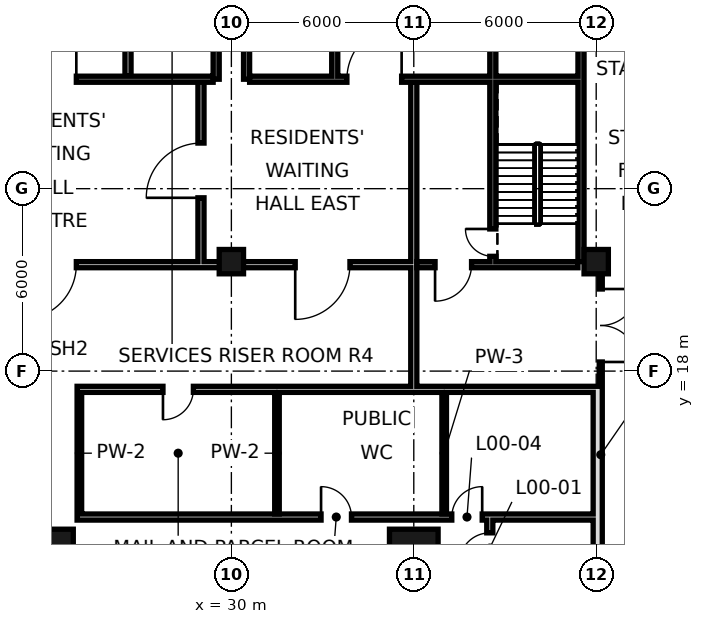
"""IFC4 building model, lengths in metres.
Left out: names, types, materials, properties, quantities, classifications, styles, units other than length and angle.
Written with IfcOpenShell. Run it as: python <this file> out.ifc"""

import sys

from ifc_helpers import new_model, si_unit, direction, frame, frame_2d, origin, origin_2d, place, context, subcontext, project, spatial, rectangle, hollow_rectangle, extrude, element, fill, save


model = new_model("IFC4")
c1 = context("Model", 3, precision=1e-05, world=origin(), true_north=direction((0.0, 1.0)))
c2 = subcontext(c1, "Body", "Model", "MODEL_VIEW")
j1 = project(units=[si_unit("LENGTHUNIT", "METRE"), si_unit("PLANEANGLEUNIT", "RADIAN")], contexts=[c1])
p1 = place(None, origin())
s1 = spatial("IfcSite", under=j1, at=p1, CompositionType="ELEMENT")
p2 = place(p1, origin())
s2 = spatial("IfcBuilding", under=s1, at=p2, CompositionType="ELEMENT")
p3 = place(p2, origin())
s3 = spatial("IfcBuildingStorey", under=s2, at=p3, CompositionType="ELEMENT", Elevation=0.0)
p4 = place(p3, frame((24.0, 12.0, 0.0), z_axis=(0.0, 0.0, 1.0), x_axis=(1.0, 0.0, 0.0)))
e1 = element("IfcColumn", 1, at=p4, inside=s3, PredefinedType="COLUMN", context=c2, shape_type="SweptSolid", body=[
    extrude(hollow_rectangle(XDim=1.6, YDim=1.6, WallThickness=0.07, at=origin_2d()), origin(), (0.0, 0.0, 1.0), 15.0),
])
p5 = place(p3, frame((30.0, 21.6, 0.0), z_axis=(0.0, 0.0, 1.0), x_axis=(1.0, 0.0, 0.0)))
e2 = element("IfcColumn", 2, at=p5, inside=s3, PredefinedType="COLUMN", context=c2, shape_type="SweptSolid", body=[
    extrude(hollow_rectangle(XDim=0.8, YDim=0.8, WallThickness=0.07, at=origin_2d()), origin(), (0.0, 0.0, 1.0), 15.0),
])
p6 = place(p3, frame((36.0, 12.0, 0.0), z_axis=(0.0, 0.0, 1.0), x_axis=(1.0, 0.0, 0.0)))
e3 = element("IfcColumn", 3, at=p6, inside=s3, PredefinedType="COLUMN", context=c2, shape_type="SweptSolid", body=[
    extrude(hollow_rectangle(XDim=1.6, YDim=1.6, WallThickness=0.07, at=origin_2d()), origin(), (0.0, 0.0, 1.0), 15.0),
])
p7 = place(p3, frame((42.0, 21.6, 0.0), z_axis=(0.0, 0.0, 1.0), x_axis=(1.0, 0.0, 0.0)))
e4 = element("IfcColumn", 4, at=p7, inside=s3, PredefinedType="COLUMN", context=c2, shape_type="SweptSolid", body=[
    extrude(hollow_rectangle(XDim=0.8, YDim=0.8, WallThickness=0.07, at=origin_2d()), origin(), (0.0, 0.0, 1.0), 15.0),
])
p8 = place(p3, frame((42.15, 8.9, 0.0), z_axis=(0.0, 0.0, 1.0), x_axis=(0.0, 1.0, 0.0)))
e5 = element("IfcWall", 5, at=p8, inside=s3, PredefinedType="SOLIDWALL", context=c2, shape_type="SweptSolid", body=[
    extrude(rectangle(XDim=12.7, YDim=0.1, at=frame_2d((6.35, 0.0))), origin(), (0.0, 0.0, 1.0), 13.83),
])
p9 = place(p8, frame((9.4, 0.0, 0.0)))
e6 = element("IfcOpeningElement", 6, at=p9, cuts=e5, PredefinedType="OPENING", context=c2, shape_type="SweptSolid", body=[
    extrude(rectangle(XDim=2.4, YDim=2.6, at=frame_2d((1.2, 1.3))), frame((0.0, 0.06, 0.0), z_axis=(0.0, -1.0, 0.0), x_axis=(1.0, 0.0, 0.0)), (0.0, 0.0, 1.0), 0.12),
])
p10 = place(p3, frame((25.0, 13.1, 0.0), z_axis=(0.0, 0.0, 1.0), x_axis=(0.0, 1.0, 0.0)))
e7 = element("IfcWall", 7, at=p10, inside=s3, PredefinedType="PARTITIONING", context=c2, shape_type="SweptSolid", body=[
    extrude(rectangle(XDim=4.4, YDim=0.15, at=frame_2d((2.2, 0.0))), origin(), (0.0, 0.0, 1.0), 14.55),
])
p11 = place(p3, frame((31.5, 13.3, 0.0), z_axis=(0.0, 0.0, 1.0), x_axis=(0.0, 1.0, 0.0)))
e8 = element("IfcWall", 8, at=p11, inside=s3, PredefinedType="PARTITIONING", context=c2, shape_type="SweptSolid", body=[
    extrude(rectangle(XDim=4.0, YDim=0.15, at=frame_2d((2.0, 0.0))), origin(), (0.0, 0.0, 1.0), 14.55),
])
p12 = place(p3, frame((36.0, 17.5, 0.0), z_axis=(0.0, 0.0, 1.0), x_axis=(0.0, 1.0, 0.0)))
e9 = element("IfcWall", 9, at=p12, inside=s3, PredefinedType="SOLIDWALL", context=c2, shape_type="SweptSolid", body=[
    extrude(rectangle(XDim=4.0, YDim=0.2, at=frame_2d((2.0, 0.0))), origin(), (0.0, 0.0, 1.0), 13.85),
])
p13 = place(p3, frame((37.0, 13.3, 0.0), z_axis=(0.0, 0.0, 1.0), x_axis=(0.0, 1.0, 0.0)))
e10 = element("IfcWall", 10, at=p13, inside=s3, PredefinedType="PARTITIONING", context=c2, shape_type="SweptSolid", body=[
    extrude(rectangle(XDim=4.0, YDim=0.15, at=frame_2d((2.0, 0.0))), origin(), (0.0, 0.0, 1.0), 14.55),
])
p14 = place(p3, frame((38.5, 8.9, 0.0), z_axis=(0.0, 0.0, 1.0), x_axis=(0.0, 1.0, 0.0)))
e11 = element("IfcWall", 11, at=p14, inside=s3, PredefinedType="SOLIDWALL", context=c2, shape_type="SweptSolid", body=[
    extrude(rectangle(XDim=4.2, YDim=0.2, at=frame_2d((2.1, 0.0))), origin(), (0.0, 0.0, 1.0), 13.85),
])
p15 = place(p14, frame((2.78, 0.0, 0.0)))
e12 = element("IfcOpeningElement", 12, at=p15, cuts=e11, PredefinedType="OPENING", context=c2, shape_type="SweptSolid", body=[
    extrude(rectangle(XDim=1.0, YDim=2.4, at=frame_2d((0.5, 1.2))), frame((0.0, 0.11, 0.0), z_axis=(0.0, -1.0, 0.0), x_axis=(1.0, 0.0, 0.0)), (0.0, 0.0, 1.0), 0.22),
])
p16 = place(p3, frame((42.0, 8.9, 0.0), z_axis=(0.0, 0.0, 1.0), x_axis=(0.0, 1.0, 0.0)))
e13 = element("IfcWall", 13, at=p16, inside=s3, PredefinedType="SOLIDWALL", context=c2, shape_type="SweptSolid", body=[
    extrude(rectangle(XDim=8.6, YDim=0.2, at=frame_2d((4.3, 0.0))), origin(), (0.0, 0.0, 1.0), 13.85),
])
p17 = place(p3, frame((25.075, 13.2, 0.0), z_axis=(0.0, 0.0, 1.0), x_axis=(1.0, 0.0, 0.0)))
e14 = element("IfcWall", 14, at=p17, inside=s3, PredefinedType="SOLIDWALL", context=c2, shape_type="SweptSolid", body=[
    extrude(rectangle(XDim=16.825, YDim=0.2, at=frame_2d((8.413, 0.0))), origin(), (0.0, 0.0, 1.0), 13.85),
])
p18 = place(p17, frame((12.175, 0.0, 0.0)))
e15 = element("IfcOpeningElement", 15, at=p18, cuts=e14, PredefinedType="OPENING", context=c2, shape_type="SweptSolid", body=[
    extrude(rectangle(XDim=1.0, YDim=2.4, at=frame_2d((0.5, 1.2))), frame((0.0, 0.11, 0.0), z_axis=(0.0, -1.0, 0.0), x_axis=(1.0, 0.0, 0.0)), (0.0, 0.0, 1.0), 0.22),
])
p19 = place(p17, frame((7.875, 0.0, 0.0)))
e16 = element("IfcOpeningElement", 16, at=p19, cuts=e14, PredefinedType="OPENING", context=c2, shape_type="SweptSolid", body=[
    extrude(rectangle(XDim=1.0, YDim=2.4, at=frame_2d((0.5, 1.2))), frame((0.0, 0.11, 0.0), z_axis=(0.0, -1.0, 0.0), x_axis=(1.0, 0.0, 0.0)), (0.0, 0.0, 1.0), 0.22),
])
p20 = place(p3, frame((25.075, 17.4, 0.0), z_axis=(0.0, 0.0, 1.0), x_axis=(1.0, 0.0, 0.0)))
e17 = element("IfcWall", 17, at=p20, inside=s3, PredefinedType="SOLIDWALL", context=c2, shape_type="SweptSolid", body=[
    extrude(rectangle(XDim=16.825, YDim=0.2, at=frame_2d((8.413, 0.0))), origin(), (0.0, 0.0, 1.0), 13.85),
])
p21 = place(p20, frame((2.675, 0.0, 0.0)))
e18 = element("IfcOpeningElement", 18, at=p21, cuts=e17, PredefinedType="OPENING", context=c2, shape_type="SweptSolid", body=[
    extrude(rectangle(XDim=1.0, YDim=2.1, at=frame_2d((0.5, 1.05))), frame((0.0, 0.11, 0.0), z_axis=(0.0, -1.0, 0.0), x_axis=(1.0, 0.0, 0.0)), (0.0, 0.0, 1.0), 0.22),
])
p22 = place(p3, frame((41.5, 21.6, 0.0), z_axis=(0.0, 0.0, 1.0), x_axis=(0.0, 1.0, 0.0)))
e19 = element("IfcWall", 19, at=p22, inside=s3, PredefinedType="SOLIDWALL", context=c2, shape_type="SweptSolid", body=[
    extrude(rectangle(XDim=23.5, YDim=0.2, at=frame_2d((11.75, 0.0))), origin(), (0.0, 0.0, 1.0), 14.55),
])
for number, where, z_axis, x_axis in (
    (20, (29.5, 27.6, 0.0), (0.0, 0.0, 1.0), (0.0, 1.0, 0.0)),
    (21, (30.5, 27.6, 0.0), (0.0, 0.0, 1.0), (0.0, 1.0, 0.0)),
):
    element("IfcWall", number, at=place(p3, frame(where, z_axis=z_axis, x_axis=x_axis)), inside=s3, PredefinedType="SOLIDWALL", context=c2, shape_type="SweptSolid", body=[
        extrude(rectangle(XDim=17.5, YDim=0.2, at=frame_2d((8.75, 0.0))), origin(), (0.0, 0.0, 1.0), 14.55),
    ])
p23 = place(p3, frame((12.1, 21.5, 0.0), z_axis=(0.0, 0.0, 1.0), x_axis=(1.0, 0.0, 0.0)))
e22 = element("IfcWall", 22, at=p23, inside=s3, PredefinedType="SOLIDWALL", context=c2, shape_type="SweptSolid", body=[
    extrude(rectangle(XDim=23.8, YDim=0.2, at=frame_2d((11.9, 0.0))), origin(), (0.0, 0.0, 1.0), 13.85),
])
p24 = place(p23, frame((2.0, 0.0, 0.0)))
e23 = element("IfcOpeningElement", 23, at=p24, cuts=e22, PredefinedType="OPENING", context=c2, shape_type="SweptSolid", body=[
    extrude(rectangle(XDim=1.8, YDim=2.1, at=frame_2d((0.9, 1.05))), frame((0.0, 0.11, 0.0), z_axis=(0.0, -1.0, 0.0), x_axis=(1.0, 0.0, 0.0)), (0.0, 0.0, 1.0), 0.22),
])
p25 = place(p23, frame((11.0, 0.0, 0.0)))
e24 = element("IfcOpeningElement", 24, at=p25, cuts=e22, PredefinedType="OPENING", context=c2, shape_type="SweptSolid", body=[
    extrude(rectangle(XDim=1.8, YDim=2.1, at=frame_2d((0.9, 1.05))), frame((0.0, 0.11, 0.0), z_axis=(0.0, -1.0, 0.0), x_axis=(1.0, 0.0, 0.0)), (0.0, 0.0, 1.0), 0.22),
])
p26 = place(p23, frame((20.0, 0.0, 0.0)))
e25 = element("IfcOpeningElement", 25, at=p26, cuts=e22, PredefinedType="OPENING", context=c2, shape_type="SweptSolid", body=[
    extrude(rectangle(XDim=1.8, YDim=2.1, at=frame_2d((0.9, 1.05))), frame((0.0, 0.11, 0.0), z_axis=(0.0, -1.0, 0.0), x_axis=(1.0, 0.0, 0.0)), (0.0, 0.0, 1.0), 0.22),
])
p27 = place(p3, frame((29.0, 21.6, 0.0), z_axis=(0.0, 0.0, 1.0), x_axis=(0.0, 1.0, 0.0)))
e26 = element("IfcWall", 26, at=p27, inside=s3, PredefinedType="PARTITIONING", context=c2, shape_type="SweptSolid", body=[
    extrude(rectangle(XDim=6.0, YDim=0.2, at=frame_2d((3.0, 0.0))), origin(), (0.0, 0.0, 1.0), 13.85),
])
p28 = place(p27, frame((2.1, 0.0, 0.0)))
e27 = element("IfcOpeningElement", 27, at=p28, cuts=e26, PredefinedType="OPENING", context=c2, shape_type="SweptSolid", body=[
    extrude(rectangle(XDim=1.8, YDim=2.1, at=frame_2d((0.9, 1.05))), frame((0.0, 0.11, 0.0), z_axis=(0.0, -1.0, 0.0), x_axis=(1.0, 0.0, 0.0)), (0.0, 0.0, 1.0), 0.22),
])
p29 = place(p3, frame((26.6, 27.7, 0.0), z_axis=(0.0, 0.0, 1.0), x_axis=(0.0, 1.0, 0.0)))
e28 = element("IfcWall", 28, at=p29, inside=s3, PredefinedType="SOLIDWALL", context=c2, shape_type="SweptSolid", body=[
    extrude(rectangle(XDim=17.3, YDim=0.2, at=frame_2d((8.65, 0.0))), origin(), (0.0, 0.0, 1.0), 14.55),
])
p30 = place(p29, frame((4.1, 0.0, 0.0)))
e29 = element("IfcOpeningElement", 29, at=p30, cuts=e28, PredefinedType="OPENING", context=c2, shape_type="SweptSolid", body=[
    extrude(rectangle(XDim=0.9, YDim=2.1, at=frame_2d((0.45, 1.05))), frame((0.0, 0.11, 0.0), z_axis=(0.0, -1.0, 0.0), x_axis=(1.0, 0.0, 0.0)), (0.0, 0.0, 1.0), 0.22),
])
p31 = place(p29, frame((10.15, 0.0, 0.0)))
e30 = element("IfcOpeningElement", 30, at=p31, cuts=e28, PredefinedType="OPENING", context=c2, shape_type="SweptSolid", body=[
    extrude(rectangle(XDim=1.0, YDim=2.1, at=frame_2d((0.5, 1.05))), frame((0.0, 0.11, 0.0), z_axis=(0.0, -1.0, 0.0), x_axis=(1.0, 0.0, 0.0)), (0.0, 0.0, 1.0), 0.22),
])
p32 = place(p29, frame((15.275, 0.0, 0.0)))
e31 = element("IfcOpeningElement", 31, at=p32, cuts=e28, PredefinedType="OPENING", context=c2, shape_type="SweptSolid", body=[
    extrude(rectangle(XDim=1.0, YDim=2.1, at=frame_2d((0.5, 1.05))), frame((0.0, 0.11, 0.0), z_axis=(0.0, -1.0, 0.0), x_axis=(1.0, 0.0, 0.0)), (0.0, 0.0, 1.0), 0.22),
])
p33 = place(p3, frame((33.4, 27.7, 0.0), z_axis=(0.0, 0.0, 1.0), x_axis=(0.0, 1.0, 0.0)))
e32 = element("IfcWall", 32, at=p33, inside=s3, PredefinedType="SOLIDWALL", context=c2, shape_type="SweptSolid", body=[
    extrude(rectangle(XDim=17.3, YDim=0.2, at=frame_2d((8.65, 0.0))), origin(), (0.0, 0.0, 1.0), 13.85),
])
p34 = place(p33, frame((15.2, 0.0, 0.0)))
e33 = element("IfcOpeningElement", 33, at=p34, cuts=e32, PredefinedType="OPENING", context=c2, shape_type="SweptSolid", body=[
    extrude(rectangle(XDim=1.1, YDim=2.1, at=frame_2d((0.55, 1.05))), frame((0.0, 0.11, 0.0), z_axis=(0.0, -1.0, 0.0), x_axis=(1.0, 0.0, 0.0)), (0.0, 0.0, 1.0), 0.22),
])
p35 = place(p33, frame((2.5, 0.0, 0.0)))
e34 = element("IfcOpeningElement", 34, at=p35, cuts=e32, PredefinedType="OPENING", context=c2, shape_type="SweptSolid", body=[
    extrude(rectangle(XDim=1.0, YDim=2.1, at=frame_2d((0.5, 1.05))), frame((0.0, 0.11, 0.0), z_axis=(0.0, -1.0, 0.0), x_axis=(1.0, 0.0, 0.0)), (0.0, 0.0, 1.0), 0.22),
])
p36 = place(p33, frame((9.7, 0.0, 0.0)))
e35 = element("IfcOpeningElement", 35, at=p36, cuts=e32, PredefinedType="OPENING", context=c2, shape_type="SweptSolid", body=[
    extrude(rectangle(XDim=0.9, YDim=2.1, at=frame_2d((0.45, 1.05))), frame((0.0, 0.11, 0.0), z_axis=(0.0, -1.0, 0.0), x_axis=(1.0, 0.0, 0.0)), (0.0, 0.0, 1.0), 0.22),
])
p37 = place(p3, frame((36.0, 21.5, 0.0), z_axis=(0.0, 0.0, 1.0), x_axis=(0.0, 1.0, 0.0)))
e36 = element("IfcWall", 36, at=p37, inside=s3, PredefinedType="PARTITIONING", context=c2, shape_type="SweptSolid", body=[
    extrude(rectangle(XDim=6.0, YDim=0.2, at=frame_2d((3.0, 0.0))), origin(), (0.0, 0.0, 1.0), 13.85),
])
p38 = place(p3, frame((38.6, 21.5, 0.0), z_axis=(0.0, 0.0, 1.0), x_axis=(0.0, 1.0, 0.0)))
e37 = element("IfcWall", 37, at=p38, inside=s3, PredefinedType="SOLIDWALL", context=c2, shape_type="SweptSolid", body=[
    extrude(rectangle(XDim=23.5, YDim=0.2, at=frame_2d((11.75, 0.0))), origin(), (0.0, 0.0, 1.0), 13.85),
])
p39 = place(p38, frame((8.7, 0.0, 0.0)))
e38 = element("IfcOpeningElement", 38, at=p39, cuts=e37, PredefinedType="OPENING", context=c2, shape_type="SweptSolid", body=[
    extrude(rectangle(XDim=1.0, YDim=2.1, at=frame_2d((0.5, 1.05))), frame((0.0, 0.11, 0.0), z_axis=(0.0, -1.0, 0.0), x_axis=(1.0, 0.0, 0.0)), (0.0, 0.0, 1.0), 0.22),
])
p40 = place(p38, frame((13.35, 0.0, 0.0)))
e39 = element("IfcOpeningElement", 39, at=p40, cuts=e37, PredefinedType="OPENING", context=c2, shape_type="SweptSolid", body=[
    extrude(rectangle(XDim=1.0, YDim=2.1, at=frame_2d((0.5, 1.05))), frame((0.0, 0.11, 0.0), z_axis=(0.0, -1.0, 0.0), x_axis=(1.0, 0.0, 0.0)), (0.0, 0.0, 1.0), 0.22),
])
p41 = place(p38, frame((22.2, 0.0, 0.0)))
e40 = element("IfcOpeningElement", 40, at=p41, cuts=e37, PredefinedType="OPENING", context=c2, shape_type="SweptSolid", body=[
    extrude(rectangle(XDim=1.0, YDim=2.1, at=frame_2d((0.5, 1.05))), frame((0.0, 0.11, 0.0), z_axis=(0.0, -1.0, 0.0), x_axis=(1.0, 0.0, 0.0)), (0.0, 0.0, 1.0), 0.22),
])
p42 = place(p38, frame((0.275, 0.0, 0.0)))
e41 = element("IfcOpeningElement", 41, at=p42, cuts=e37, PredefinedType="OPENING", context=c2, shape_type="SweptSolid", body=[
    extrude(rectangle(XDim=0.9, YDim=2.1, at=frame_2d((0.45, 1.05))), frame((0.0, 0.11, 0.0), z_axis=(0.0, -1.0, 0.0), x_axis=(1.0, 0.0, 0.0)), (0.0, 0.0, 1.0), 0.22),
])
p43 = place(p3, frame((36.1, 21.5, 0.0), z_axis=(0.0, 0.0, 1.0), x_axis=(1.0, 0.0, 0.0)))
e42 = element("IfcWall", 42, at=p43, inside=s3, PredefinedType="SOLIDWALL", context=c2, shape_type="SweptSolid", body=[
    extrude(rectangle(XDim=5.3, YDim=0.2, at=frame_2d((2.65, 0.0))), origin(), (0.0, 0.0, 1.0), 13.85),
])
p44 = place(p43, frame((0.6, 0.0, 0.0)))
e43 = element("IfcOpeningElement", 43, at=p44, cuts=e42, PredefinedType="OPENING", context=c2, shape_type="SweptSolid", body=[
    extrude(rectangle(XDim=1.2, YDim=2.1, at=frame_2d((0.6, 1.05))), frame((0.0, 0.11, 0.0), z_axis=(0.0, -1.0, 0.0), x_axis=(1.0, 0.0, 0.0)), (0.0, 0.0, 1.0), 0.22),
])
p45 = place(p3, frame((18.6, 27.6, 0.0), z_axis=(0.0, 0.0, 1.0), x_axis=(1.0, 0.0, 0.0)))
e44 = element("IfcWall", 44, at=p45, inside=s3, PredefinedType="SOLIDWALL", context=c2, shape_type="SweptSolid", body=[
    extrude(rectangle(XDim=10.8, YDim=0.2, at=frame_2d((5.4, 0.0))), origin(), (0.0, 0.0, 1.0), 14.55),
])
p46 = place(p45, frame((4.5, 0.0, 0.0)))
e45 = element("IfcOpeningElement", 45, at=p46, cuts=e44, PredefinedType="OPENING", context=c2, shape_type="SweptSolid", body=[
    extrude(rectangle(XDim=1.8, YDim=2.1, at=frame_2d((0.9, 1.05))), frame((0.0, 0.11, 0.0), z_axis=(0.0, -1.0, 0.0), x_axis=(1.0, 0.0, 0.0)), (0.0, 0.0, 1.0), 0.22),
])
p47 = place(p3, frame((30.6, 27.6, 0.0), z_axis=(0.0, 0.0, 1.0), x_axis=(1.0, 0.0, 0.0)))
e46 = element("IfcWall", 46, at=p47, inside=s3, PredefinedType="SOLIDWALL", context=c2, shape_type="SweptSolid", body=[
    extrude(rectangle(XDim=10.8, YDim=0.2, at=frame_2d((5.4, 0.0))), origin(), (0.0, 0.0, 1.0), 14.55),
])
p48 = place(p47, frame((3.2, 0.0, 0.0)))
e47 = element("IfcOpeningElement", 47, at=p48, cuts=e46, PredefinedType="OPENING", context=c2, shape_type="SweptSolid", body=[
    extrude(rectangle(XDim=1.8, YDim=2.1, at=frame_2d((0.9, 1.05))), frame((0.0, 0.11, 0.0), z_axis=(0.0, -1.0, 0.0), x_axis=(1.0, 0.0, 0.0)), (0.0, 0.0, 1.0), 0.22),
])
p49 = place(p9, frame((2.4, 0.0, 0.0), z_axis=(0.0, 0.0, 1.0), x_axis=(-1.0, 0.0, 0.0)))
e48 = element("IfcDoor", 48, at=p49, inside=s3, OperationType="DOUBLE_DOOR_SINGLE_SWING", PredefinedType="DOOR", context=c2, shape_type="SweptSolid", body=[
    extrude(rectangle(XDim=2.4, YDim=2.6, at=frame_2d((1.2, 1.3))), frame((0.0, 0.025, 0.0), z_axis=(0.0, -1.0, 0.0), x_axis=(1.0, 0.0, 0.0)), (0.0, 0.0, 1.0), 0.05),
])
fill(e6, e48)
p50 = place(p15, origin())
e49 = element("IfcDoor", 49, at=p50, inside=s3, OperationType="SINGLE_SWING_LEFT", PredefinedType="DOOR", context=c2, shape_type="SweptSolid", body=[
    extrude(rectangle(XDim=1.0, YDim=2.4, at=frame_2d((0.5, 1.2))), frame((0.0, 0.025, 0.0), z_axis=(0.0, -1.0, 0.0), x_axis=(1.0, 0.0, 0.0)), (0.0, 0.0, 1.0), 0.05),
])
fill(e12, e49)
p51 = place(p21, frame((1.0, 0.0, 0.0), z_axis=(0.0, 0.0, 1.0), x_axis=(-1.0, 0.0, 0.0)))
e50 = element("IfcDoor", 50, at=p51, inside=s3, OperationType="SINGLE_SWING_RIGHT", PredefinedType="DOOR", context=c2, shape_type="SweptSolid", body=[
    extrude(rectangle(XDim=1.0, YDim=2.1, at=frame_2d((0.5, 1.05))), frame((0.0, 0.025, 0.0), z_axis=(0.0, -1.0, 0.0), x_axis=(1.0, 0.0, 0.0)), (0.0, 0.0, 1.0), 0.05),
])
fill(e18, e50)
p52 = place(p18, frame((1.0, 0.0, 0.0), z_axis=(0.0, 0.0, 1.0), x_axis=(-1.0, 0.0, 0.0)))
e51 = element("IfcDoor", 51, at=p52, inside=s3, OperationType="SINGLE_SWING_LEFT", PredefinedType="DOOR", context=c2, shape_type="SweptSolid", body=[
    extrude(rectangle(XDim=1.0, YDim=2.4, at=frame_2d((0.5, 1.2))), frame((0.0, 0.025, 0.0), z_axis=(0.0, -1.0, 0.0), x_axis=(1.0, 0.0, 0.0)), (0.0, 0.0, 1.0), 0.05),
])
fill(e15, e51)
p53 = place(p19, origin())
e52 = element("IfcDoor", 52, at=p53, inside=s3, OperationType="SINGLE_SWING_LEFT", PredefinedType="DOOR", context=c2, shape_type="SweptSolid", body=[
    extrude(rectangle(XDim=1.0, YDim=2.4, at=frame_2d((0.5, 1.2))), frame((0.0, 0.025, 0.0), z_axis=(0.0, -1.0, 0.0), x_axis=(1.0, 0.0, 0.0)), (0.0, 0.0, 1.0), 0.05),
])
fill(e16, e52)
p54 = place(p25, frame((1.8, 0.0, 0.0), z_axis=(0.0, 0.0, 1.0), x_axis=(-1.0, 0.0, 0.0)))
e53 = element("IfcDoor", 53, at=p54, inside=s3, OperationType="SINGLE_SWING_RIGHT", PredefinedType="DOOR", context=c2, shape_type="SweptSolid", body=[
    extrude(rectangle(XDim=1.8, YDim=2.1, at=frame_2d((0.9, 1.05))), frame((0.0, 0.025, 0.0), z_axis=(0.0, -1.0, 0.0), x_axis=(1.0, 0.0, 0.0)), (0.0, 0.0, 1.0), 0.05),
])
fill(e24, e53)
p55 = place(p28, origin())
e54 = element("IfcDoor", 54, at=p55, inside=s3, OperationType="SINGLE_SWING_LEFT", PredefinedType="DOOR", context=c2, shape_type="SweptSolid", body=[
    extrude(rectangle(XDim=1.8, YDim=2.1, at=frame_2d((0.9, 1.05))), frame((0.0, 0.025, 0.0), z_axis=(0.0, -1.0, 0.0), x_axis=(1.0, 0.0, 0.0)), (0.0, 0.0, 1.0), 0.05),
])
fill(e27, e54)
p56 = place(p26, frame((1.8, 0.0, 0.0), z_axis=(0.0, 0.0, 1.0), x_axis=(-1.0, 0.0, 0.0)))
e55 = element("IfcDoor", 55, at=p56, inside=s3, OperationType="SINGLE_SWING_RIGHT", PredefinedType="DOOR", context=c2, shape_type="SweptSolid", body=[
    extrude(rectangle(XDim=1.8, YDim=2.1, at=frame_2d((0.9, 1.05))), frame((0.0, 0.025, 0.0), z_axis=(0.0, -1.0, 0.0), x_axis=(1.0, 0.0, 0.0)), (0.0, 0.0, 1.0), 0.05),
])
fill(e25, e55)
p57 = place(p44, frame((1.2, 0.0, 0.0), z_axis=(0.0, 0.0, 1.0), x_axis=(-1.0, 0.0, 0.0)))
e56 = element("IfcDoor", 56, at=p57, inside=s3, OperationType="SINGLE_SWING_RIGHT", PredefinedType="DOOR", context=c2, shape_type="SweptSolid", body=[
    extrude(rectangle(XDim=1.2, YDim=2.1, at=frame_2d((0.6, 1.05))), frame((0.0, 0.025, 0.0), z_axis=(0.0, -1.0, 0.0), x_axis=(1.0, 0.0, 0.0)), (0.0, 0.0, 1.0), 0.05),
])
fill(e43, e56)
p58 = place(p46, frame((1.8, 0.0, 0.0), z_axis=(0.0, 0.0, 1.0), x_axis=(-1.0, 0.0, 0.0)))
e57 = element("IfcDoor", 57, at=p58, inside=s3, OperationType="SINGLE_SWING_LEFT", PredefinedType="DOOR", context=c2, shape_type="SweptSolid", body=[
    extrude(rectangle(XDim=1.8, YDim=2.1, at=frame_2d((0.9, 1.05))), frame((0.0, 0.025, 0.0), z_axis=(0.0, -1.0, 0.0), x_axis=(1.0, 0.0, 0.0)), (0.0, 0.0, 1.0), 0.05),
])
fill(e45, e57)
p59 = place(p48, frame((1.8, 0.0, 0.0), z_axis=(0.0, 0.0, 1.0), x_axis=(-1.0, 0.0, 0.0)))
e58 = element("IfcDoor", 58, at=p59, inside=s3, OperationType="SINGLE_SWING_LEFT", PredefinedType="DOOR", context=c2, shape_type="SweptSolid", body=[
    extrude(rectangle(XDim=1.8, YDim=2.1, at=frame_2d((0.9, 1.05))), frame((0.0, 0.025, 0.0), z_axis=(0.0, -1.0, 0.0), x_axis=(1.0, 0.0, 0.0)), (0.0, 0.0, 1.0), 0.05),
])
fill(e47, e58)
p60 = place(p42, frame((0.9, 0.0, 0.0), z_axis=(0.0, 0.0, 1.0), x_axis=(-1.0, 0.0, 0.0)))
e59 = element("IfcDoor", 59, at=p60, inside=s3, OperationType="SINGLE_SWING_LEFT", PredefinedType="DOOR", context=c2, shape_type="SweptSolid", body=[
    extrude(rectangle(XDim=0.9, YDim=2.1, at=frame_2d((0.45, 1.05))), frame((0.0, 0.025, 0.0), z_axis=(0.0, -1.0, 0.0), x_axis=(1.0, 0.0, 0.0)), (0.0, 0.0, 1.0), 0.05),
])
fill(e41, e59)
save(model, sys.argv[1])
